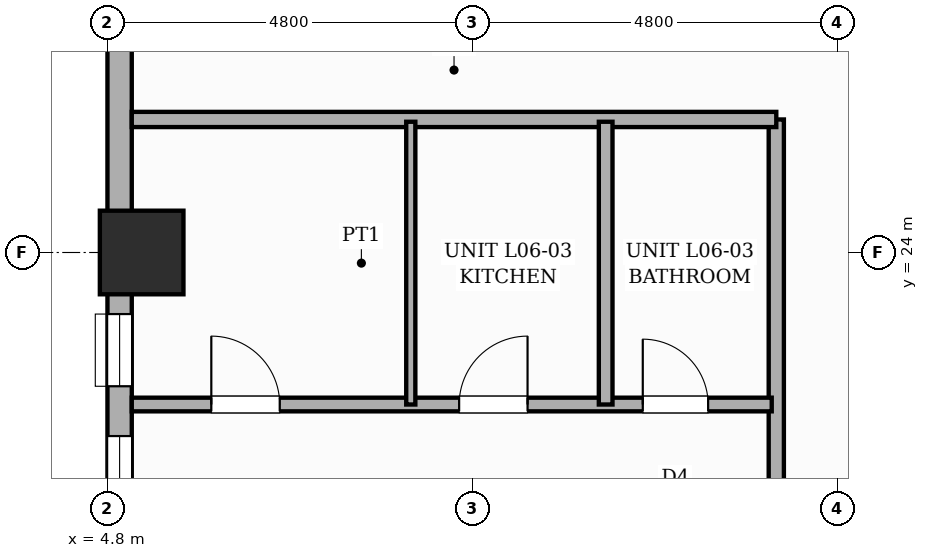
"""IFC4 building model, lengths in metres.
Left out: names, types, materials, properties, quantities, classifications, styles, units other than length and angle.
Written with IfcOpenShell. Run it as: python <this file> out.ifc"""

import sys

from ifc_helpers import new_model, si_unit, direction, frame, frame_2d, origin, origin_2d, place, context, subcontext, project, spatial, rectangle, extrude, element, fill, save


model = new_model("IFC4")
c1 = context("Model", 3, precision=1e-05, world=origin(), true_north=direction((0.0, 1.0)))
c2 = subcontext(c1, "Body", "Model", "MODEL_VIEW")
j1 = project(units=[si_unit("LENGTHUNIT", "METRE"), si_unit("PLANEANGLEUNIT", "RADIAN")], contexts=[c1])
p1 = place(None, origin())
s1 = spatial("IfcSite", under=j1, at=p1, CompositionType="ELEMENT")
p2 = place(p1, origin())
s2 = spatial("IfcBuilding", under=s1, at=p2, CompositionType="ELEMENT")
p3 = place(p2, frame((0.0, 0.0, 28.6)))
s3 = spatial("IfcBuildingStorey", under=s2, at=p3, CompositionType="ELEMENT", Elevation=28.6)
p4 = place(p3, frame((5.25, 24.0, 0.0), z_axis=(0.0, 0.0, 1.0), x_axis=(1.0, 0.0, 0.0)))
e1 = element("IfcColumn", 1, at=p4, inside=s3, PredefinedType="COLUMN", context=c2, shape_type="SweptSolid", body=[
    extrude(rectangle(XDim=1.1, YDim=1.1, at=origin_2d()), origin(), (0.0, 0.0, 1.0), 3.6),
])
p5 = place(p3, frame((4.96, 7.2, 0.0), z_axis=(0.0, 0.0, 1.0), x_axis=(0.0, 1.0, 0.0)))
e2 = element("IfcWall", 2, at=p5, inside=s3, PredefinedType="STANDARD", context=c2, shape_type="SweptSolid", body=[
    extrude(rectangle(XDim=38.4, YDim=0.32, at=frame_2d((19.2, 0.0))), origin(), (0.0, 0.0, 1.0), 2.53),
])
p6 = place(p5, frame((9.55, 0.0, 0.0)))
e3 = element("IfcOpeningElement", 3, at=p6, cuts=e2, PredefinedType="OPENING", context=c2, shape_type="SweptSolid", body=[
    extrude(rectangle(XDim=1.1, YDim=2.15, at=frame_2d((0.55, 1.075))), frame((0.0, 0.17, 0.0), z_axis=(0.0, -1.0, 0.0), x_axis=(1.0, 0.0, 0.0)), (0.0, 0.0, 1.0), 0.34),
])
p7 = place(p5, frame((0.635, 0.0, 0.45)))
e4 = element("IfcOpeningElement", 4, at=p7, cuts=e2, PredefinedType="OPENING", context=c2, shape_type="SweptSolid", body=[
    extrude(rectangle(XDim=0.95, YDim=1.8, at=frame_2d((0.475, 0.9))), frame((0.0, 0.17, 0.0), z_axis=(0.0, -1.0, 0.0), x_axis=(1.0, 0.0, 0.0)), (0.0, 0.0, 1.0), 0.34),
])
p8 = place(p5, frame((15.04, 0.0, 0.45)))
e5 = element("IfcOpeningElement", 5, at=p8, cuts=e2, PredefinedType="OPENING", context=c2, shape_type="SweptSolid", body=[
    extrude(rectangle(XDim=0.95, YDim=1.8, at=frame_2d((0.475, 0.9))), frame((0.0, 0.17, 0.0), z_axis=(0.0, -1.0, 0.0), x_axis=(1.0, 0.0, 0.0)), (0.0, 0.0, 1.0), 0.34),
])
p9 = place(p5, frame((4.815, 0.0, 0.65)))
e6 = element("IfcOpeningElement", 6, at=p9, cuts=e2, PredefinedType="OPENING", context=c2, shape_type="SweptSolid", body=[
    extrude(rectangle(XDim=1.4, YDim=1.1, at=frame_2d((0.7, 0.55))), frame((0.0, 0.17, 0.0), z_axis=(0.0, -1.0, 0.0), x_axis=(1.0, 0.0, 0.0)), (0.0, 0.0, 1.0), 0.34),
])
p10 = place(p5, frame((12.985, 0.0, 0.65)))
e7 = element("IfcOpeningElement", 7, at=p10, cuts=e2, PredefinedType="OPENING", context=c2, shape_type="SweptSolid", body=[
    extrude(rectangle(XDim=1.4, YDim=1.1, at=frame_2d((0.7, 0.55))), frame((0.0, 0.17, 0.0), z_axis=(0.0, -1.0, 0.0), x_axis=(1.0, 0.0, 0.0)), (0.0, 0.0, 1.0), 0.34),
])
p11 = place(p3, frame((13.6, 5.12, 0.0), z_axis=(0.0, 0.0, 1.0), x_axis=(0.0, 1.0, 0.0)))
e8 = element("IfcWall", 8, at=p11, inside=s3, PredefinedType="PARTITIONING", context=c2, shape_type="SweptSolid", body=[
    extrude(rectangle(XDim=20.63, YDim=0.2, at=frame_2d((10.315, 0.0))), origin(), (0.0, 0.0, 1.0), 3.35),
])
p12 = place(p11, frame((1.025, 0.0, 0.0)))
e9 = element("IfcOpeningElement", 9, at=p12, cuts=e8, PredefinedType="OPENING", context=c2, shape_type="SweptSolid", body=[
    extrude(rectangle(XDim=0.98, YDim=2.18, at=frame_2d((0.49, 1.09))), frame((0.0, 0.11, 0.0), z_axis=(0.0, -1.0, 0.0), x_axis=(1.0, 0.0, 0.0)), (0.0, 0.0, 1.0), 0.22),
])
p13 = place(p11, frame((8.39, 0.0, 0.0)))
e10 = element("IfcOpeningElement", 10, at=p13, cuts=e8, PredefinedType="OPENING", context=c2, shape_type="SweptSolid", body=[
    extrude(rectangle(XDim=0.98, YDim=2.18, at=frame_2d((0.49, 1.09))), frame((0.0, 0.11, 0.0), z_axis=(0.0, -1.0, 0.0), x_axis=(1.0, 0.0, 0.0)), (0.0, 0.0, 1.0), 0.22),
])
p14 = place(p11, frame((14.71, 0.0, 0.0)))
e11 = element("IfcOpeningElement", 11, at=p14, cuts=e8, PredefinedType="OPENING", context=c2, shape_type="SweptSolid", body=[
    extrude(rectangle(XDim=0.98, YDim=2.18, at=frame_2d((0.49, 1.09))), frame((0.0, 0.11, 0.0), z_axis=(0.0, -1.0, 0.0), x_axis=(1.0, 0.0, 0.0)), (0.0, 0.0, 1.0), 0.22),
])
p15 = place(p3, frame((5.12, 25.75, 0.0), z_axis=(0.0, 0.0, 1.0), x_axis=(1.0, 0.0, 0.0)))
e12 = element("IfcWall", 12, at=p15, inside=s3, PredefinedType="PARTITIONING", context=c2, shape_type="SweptSolid", body=[
    extrude(rectangle(XDim=8.48, YDim=0.2, at=frame_2d((4.24, 0.0))), origin(), (0.0, 0.0, 1.0), 3.35),
])
p16 = place(p3, frame((5.12, 22.0, 0.0), z_axis=(0.0, 0.0, 1.0), x_axis=(1.0, 0.0, 0.0)))
e13 = element("IfcWall", 13, at=p16, inside=s3, PredefinedType="PLUMBINGWALL", context=c2, shape_type="SweptSolid", body=[
    extrude(rectangle(XDim=8.42, YDim=0.18, at=frame_2d((4.21, 0.0))), origin(), (0.0, 0.0, 1.0), 3.35),
])
p17 = place(p16, frame((1.046, 0.0, 0.0)))
e14 = element("IfcOpeningElement", 14, at=p17, cuts=e13, PredefinedType="OPENING", context=c2, shape_type="SweptSolid", body=[
    extrude(rectangle(XDim=0.9, YDim=2.15, at=frame_2d((0.45, 1.075))), frame((0.0, 0.1, 0.0), z_axis=(0.0, -1.0, 0.0), x_axis=(1.0, 0.0, 0.0)), (0.0, 0.0, 1.0), 0.2),
])
p18 = place(p16, frame((4.307, 0.0, 0.0)))
e15 = element("IfcOpeningElement", 15, at=p18, cuts=e13, PredefinedType="OPENING", context=c2, shape_type="SweptSolid", body=[
    extrude(rectangle(XDim=0.9, YDim=2.15, at=frame_2d((0.45, 1.075))), frame((0.0, 0.1, 0.0), z_axis=(0.0, -1.0, 0.0), x_axis=(1.0, 0.0, 0.0)), (0.0, 0.0, 1.0), 0.2),
])
p19 = place(p16, frame((6.723, 0.0, 0.0)))
e16 = element("IfcOpeningElement", 16, at=p19, cuts=e13, PredefinedType="OPENING", context=c2, shape_type="SweptSolid", body=[
    extrude(rectangle(XDim=0.86, YDim=2.1, at=frame_2d((0.43, 1.05))), frame((0.0, 0.1, 0.0), z_axis=(0.0, -1.0, 0.0), x_axis=(1.0, 0.0, 0.0)), (0.0, 0.0, 1.0), 0.2),
])
p20 = place(p3, frame((8.791, 22.0, 0.0), z_axis=(0.0, 0.0, 1.0), x_axis=(0.0, 1.0, 0.0)))
e17 = element("IfcWall", 17, at=p20, inside=s3, PredefinedType="PARTITIONING", context=c2, shape_type="SweptSolid", body=[
    extrude(rectangle(XDim=3.72, YDim=0.12, at=frame_2d((1.86, 0.0))), origin(), (0.0, 0.0, 1.0), 3.35),
])
p21 = place(p3, frame((11.355, 22.0, 0.0), z_axis=(0.0, 0.0, 1.0), x_axis=(0.0, 1.0, 0.0)))
e18 = element("IfcWall", 18, at=p21, inside=s3, PredefinedType="PLUMBINGWALL", context=c2, shape_type="SweptSolid", body=[
    extrude(rectangle(XDim=3.72, YDim=0.18, at=frame_2d((1.86, 0.0))), origin(), (0.0, 0.0, 1.0), 3.35),
])
p22 = place(p8, origin())
e19 = element("IfcWindow", 19, at=p22, inside=s3, PartitioningType="SINGLE_PANEL", PredefinedType="WINDOW", context=c2, shape_type="SweptSolid", body=[
    extrude(rectangle(XDim=0.95, YDim=1.8, at=frame_2d((0.475, 0.9))), frame((0.0, 0.03, 0.0), z_axis=(0.0, -1.0, 0.0), x_axis=(1.0, 0.0, 0.0)), (0.0, 0.0, 1.0), 0.06),
])
fill(e5, e19)
p23 = place(p10, origin())
e20 = element("IfcWindow", 20, at=p23, inside=s3, PartitioningType="SINGLE_PANEL", PredefinedType="WINDOW", context=c2, shape_type="SweptSolid", body=[
    extrude(rectangle(XDim=1.4, YDim=1.1, at=frame_2d((0.7, 0.55))), frame((0.0, 0.03, 0.0), z_axis=(0.0, -1.0, 0.0), x_axis=(1.0, 0.0, 0.0)), (0.0, 0.0, 1.0), 0.06),
])
fill(e7, e20)
p24 = place(p17, origin())
e21 = element("IfcDoor", 21, at=p24, inside=s3, OperationType="SINGLE_SWING_LEFT", PredefinedType="DOOR", context=c2, shape_type="SweptSolid", body=[
    extrude(rectangle(XDim=0.9, YDim=2.15, at=frame_2d((0.45, 1.075))), frame((0.0, 0.025, 0.0), z_axis=(0.0, -1.0, 0.0), x_axis=(1.0, 0.0, 0.0)), (0.0, 0.0, 1.0), 0.05),
])
fill(e14, e21)
p25 = place(p18, origin())
e22 = element("IfcDoor", 22, at=p25, inside=s3, OperationType="SINGLE_SWING_RIGHT", PredefinedType="DOOR", context=c2, shape_type="SweptSolid", body=[
    extrude(rectangle(XDim=0.9, YDim=2.15, at=frame_2d((0.45, 1.075))), frame((0.0, 0.025, 0.0), z_axis=(0.0, -1.0, 0.0), x_axis=(1.0, 0.0, 0.0)), (0.0, 0.0, 1.0), 0.05),
])
fill(e15, e22)
p26 = place(p19, origin())
e23 = element("IfcDoor", 23, at=p26, inside=s3, OperationType="SINGLE_SWING_LEFT", PredefinedType="DOOR", context=c2, shape_type="SweptSolid", body=[
    extrude(rectangle(XDim=0.86, YDim=2.1, at=frame_2d((0.43, 1.05))), frame((0.0, 0.025, 0.0), z_axis=(0.0, -1.0, 0.0), x_axis=(1.0, 0.0, 0.0)), (0.0, 0.0, 1.0), 0.05),
])
fill(e16, e23)
save(model, sys.argv[1])
